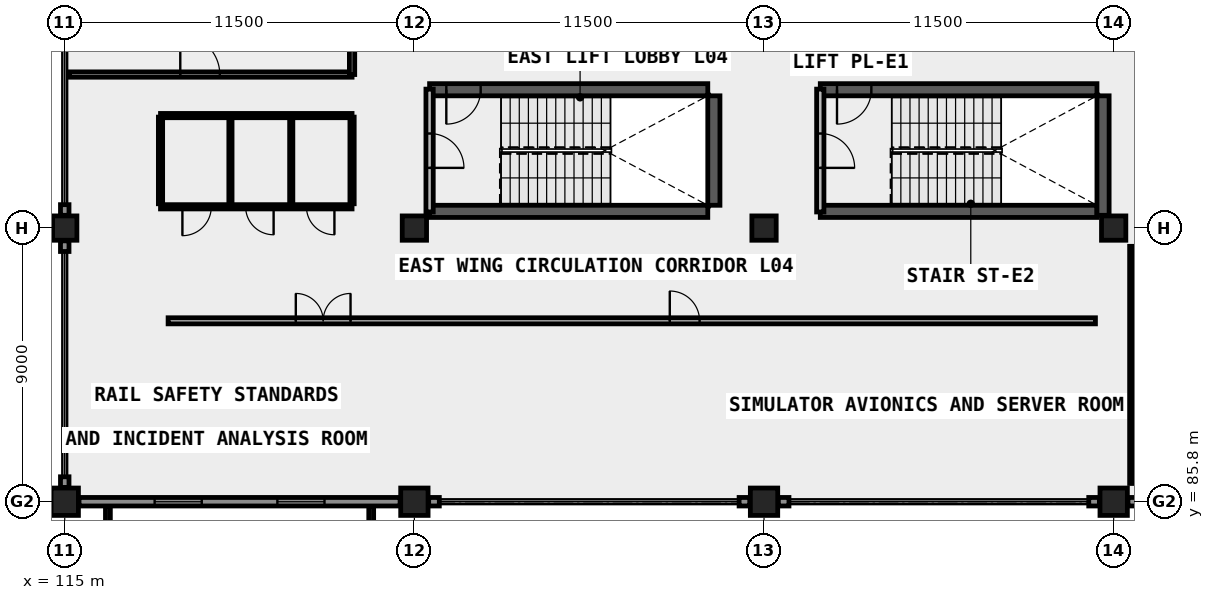
"""IFC4 building model, lengths in metres.
Left out: names, types, materials, properties, quantities, classifications, styles, units other than length and angle.
Written with IfcOpenShell. Run it as: python <this file> out.ifc"""

import sys

from ifc_helpers import new_model, si_unit, direction, frame, frame_2d, origin, origin_2d, place, context, subcontext, project, spatial, rectangle, extrude, element, fill, save


model = new_model("IFC4")
c1 = context("Model", 3, precision=1e-05, world=origin(), true_north=direction((0.0, 1.0)))
c2 = subcontext(c1, "Body", "Model", "MODEL_VIEW")
j1 = project(units=[si_unit("LENGTHUNIT", "METRE"), si_unit("PLANEANGLEUNIT", "RADIAN")], contexts=[c1])
p1 = place(None, origin())
s1 = spatial("IfcSite", under=j1, at=p1, CompositionType="ELEMENT")
p2 = place(p1, origin())
s2 = spatial("IfcBuilding", under=s1, at=p2, CompositionType="ELEMENT")
p3 = place(p2, frame((0.0, 0.0, 18.3)))
s3 = spatial("IfcBuildingStorey", under=s2, at=p3, CompositionType="ELEMENT", Elevation=18.3)
p4 = place(p3, frame((115.0, 85.8, 0.0), z_axis=(0.0, 0.0, 1.0), x_axis=(1.0, 0.0, 0.0)))
e1 = element("IfcColumn", 1, at=p4, inside=s3, PredefinedType="COLUMN", context=c2, shape_type="SweptSolid", body=[
    extrude(rectangle(XDim=0.9, YDim=0.9, at=origin_2d()), origin(), (0.0, 0.0, 1.0), 4.16),
])
p5 = place(p3, frame((115.0, 94.8, 0.0), z_axis=(0.0, 0.0, 1.0), x_axis=(1.0, 0.0, 0.0)))
e2 = element("IfcColumn", 2, at=p5, inside=s3, PredefinedType="COLUMN", context=c2, shape_type="SweptSolid", body=[
    extrude(rectangle(XDim=0.8, YDim=0.8, at=origin_2d()), origin(), (0.0, 0.0, 1.0), 4.16),
])
p6 = place(p3, frame((126.5, 85.8, 0.0), z_axis=(0.0, 0.0, 1.0), x_axis=(1.0, 0.0, 0.0)))
e3 = element("IfcColumn", 3, at=p6, inside=s3, PredefinedType="COLUMN", context=c2, shape_type="SweptSolid", body=[
    extrude(rectangle(XDim=0.9, YDim=0.9, at=origin_2d()), origin(), (0.0, 0.0, 1.0), 4.16),
])
p7 = place(p3, frame((126.5, 94.8, 0.0), z_axis=(0.0, 0.0, 1.0), x_axis=(1.0, 0.0, 0.0)))
e4 = element("IfcColumn", 4, at=p7, inside=s3, PredefinedType="COLUMN", context=c2, shape_type="SweptSolid", body=[
    extrude(rectangle(XDim=0.8, YDim=0.8, at=origin_2d()), origin(), (0.0, 0.0, 1.0), 4.16),
])
p8 = place(p3, frame((138.0, 85.8, 0.0), z_axis=(0.0, 0.0, 1.0), x_axis=(1.0, 0.0, 0.0)))
e5 = element("IfcColumn", 5, at=p8, inside=s3, PredefinedType="COLUMN", context=c2, shape_type="SweptSolid", body=[
    extrude(rectangle(XDim=0.9, YDim=0.9, at=origin_2d()), origin(), (0.0, 0.0, 1.0), 4.16),
])
p9 = place(p3, frame((138.0, 94.8, 0.0), z_axis=(0.0, 0.0, 1.0), x_axis=(1.0, 0.0, 0.0)))
e6 = element("IfcColumn", 6, at=p9, inside=s3, PredefinedType="COLUMN", context=c2, shape_type="SweptSolid", body=[
    extrude(rectangle(XDim=0.8, YDim=0.8, at=origin_2d()), origin(), (0.0, 0.0, 1.0), 4.16),
])
p10 = place(p3, frame((149.5, 85.8, 0.0), z_axis=(0.0, 0.0, 1.0), x_axis=(1.0, 0.0, 0.0)))
e7 = element("IfcColumn", 7, at=p10, inside=s3, PredefinedType="COLUMN", context=c2, shape_type="SweptSolid", body=[
    extrude(rectangle(XDim=0.9, YDim=0.9, at=origin_2d()), origin(), (0.0, 0.0, 1.0), 4.16),
])
p11 = place(p3, frame((149.5, 94.8, 0.0), z_axis=(0.0, 0.0, 1.0), x_axis=(1.0, 0.0, 0.0)))
e8 = element("IfcColumn", 8, at=p11, inside=s3, PredefinedType="COLUMN", context=c2, shape_type="SweptSolid", body=[
    extrude(rectangle(XDim=0.8, YDim=0.8, at=origin_2d()), origin(), (0.0, 0.0, 1.0), 4.16),
])
p12 = place(p3, frame((127.0, 95.35, 0.0), z_axis=(0.0, 0.0, 1.0), x_axis=(1.0, 0.0, 0.0)))
e9 = element("IfcWall", 9, at=p12, inside=s3, PredefinedType="SHEAR", context=c2, shape_type="SweptSolid", body=[
    extrude(rectangle(XDim=9.15, YDim=0.4, at=frame_2d((4.575, 0.0))), origin(), (0.0, 0.0, 1.0), 4.16),
])
p13 = place(p3, frame((127.0, 99.35, 0.0), z_axis=(0.0, 0.0, 1.0), x_axis=(1.0, 0.0, 0.0)))
e10 = element("IfcWall", 10, at=p13, inside=s3, PredefinedType="SHEAR", context=c2, shape_type="SweptSolid", body=[
    extrude(rectangle(XDim=9.15, YDim=0.4, at=frame_2d((4.575, 0.0))), origin(), (0.0, 0.0, 1.0), 4.16),
])
p14 = place(p13, frame((0.55, 0.0, 0.0)))
e11 = element("IfcOpeningElement", 11, at=p14, cuts=e10, PredefinedType="OPENING", context=c2, shape_type="SweptSolid", body=[
    extrude(rectangle(XDim=1.13, YDim=2.15, at=frame_2d((0.565, 1.075))), frame((0.0, 0.21, 0.0), z_axis=(0.0, -1.0, 0.0), x_axis=(1.0, 0.0, 0.0)), (0.0, 0.0, 1.0), 0.42),
])
p15 = place(p3, frame((136.35, 95.55, 0.0), z_axis=(0.0, 0.0, 1.0), x_axis=(0.0, 1.0, 0.0)))
e12 = element("IfcWall", 12, at=p15, inside=s3, PredefinedType="SHEAR", context=c2, shape_type="SweptSolid", body=[
    extrude(rectangle(XDim=3.6, YDim=0.4, at=frame_2d((1.8, 0.0))), origin(), (0.0, 0.0, 1.0), 4.16),
])
p16 = place(p3, frame((139.85, 95.35, 0.0), z_axis=(0.0, 0.0, 1.0), x_axis=(1.0, 0.0, 0.0)))
e13 = element("IfcWall", 13, at=p16, inside=s3, PredefinedType="SHEAR", context=c2, shape_type="SweptSolid", body=[
    extrude(rectangle(XDim=9.1, YDim=0.4, at=frame_2d((4.55, 0.0))), origin(), (0.0, 0.0, 1.0), 4.16),
])
p17 = place(p3, frame((139.85, 99.35, 0.0), z_axis=(0.0, 0.0, 1.0), x_axis=(1.0, 0.0, 0.0)))
e14 = element("IfcWall", 14, at=p17, inside=s3, PredefinedType="SHEAR", context=c2, shape_type="SweptSolid", body=[
    extrude(rectangle(XDim=9.1, YDim=0.4, at=frame_2d((4.55, 0.0))), origin(), (0.0, 0.0, 1.0), 4.16),
])
p18 = place(p17, frame((0.55, 0.0, 0.0)))
e15 = element("IfcOpeningElement", 15, at=p18, cuts=e14, PredefinedType="OPENING", context=c2, shape_type="SweptSolid", body=[
    extrude(rectangle(XDim=1.13, YDim=2.15, at=frame_2d((0.565, 1.075))), frame((0.0, 0.21, 0.0), z_axis=(0.0, -1.0, 0.0), x_axis=(1.0, 0.0, 0.0)), (0.0, 0.0, 1.0), 0.42),
])
p19 = place(p3, frame((149.15, 95.22, 0.0), z_axis=(0.0, 0.0, 1.0), x_axis=(0.0, 1.0, 0.0)))
e16 = element("IfcWall", 16, at=p19, inside=s3, PredefinedType="SHEAR", context=c2, shape_type="SweptSolid", body=[
    extrude(rectangle(XDim=3.93, YDim=0.4, at=frame_2d((1.965, 0.0))), origin(), (0.0, 0.0, 1.0), 4.16),
])
p20 = place(p3, frame((115.47, 85.8, 0.0), z_axis=(0.0, 0.0, 1.0), x_axis=(1.0, 0.0, 0.0)))
e17 = element("IfcWall", 17, at=p20, inside=s3, PredefinedType="SOLIDWALL", context=c2, shape_type="SweptSolid", body=[
    extrude(rectangle(XDim=10.56, YDim=0.28, at=frame_2d((5.28, 0.0))), origin(), (0.0, 0.0, 1.0), 3.1),
])
p21 = place(p20, frame((2.487, 0.0, 0.85)))
e18 = element("IfcOpeningElement", 18, at=p21, cuts=e17, PredefinedType="OPENING", context=c2, shape_type="SweptSolid", body=[
    extrude(rectangle(XDim=1.55, YDim=1.85, at=frame_2d((0.775, 0.925))), frame((0.0, 0.15, 0.0), z_axis=(0.0, -1.0, 0.0), x_axis=(1.0, 0.0, 0.0)), (0.0, 0.0, 1.0), 0.3),
])
p22 = place(p20, frame((6.523, 0.0, 0.85)))
e19 = element("IfcOpeningElement", 19, at=p22, cuts=e17, PredefinedType="OPENING", context=c2, shape_type="SweptSolid", body=[
    extrude(rectangle(XDim=1.55, YDim=1.85, at=frame_2d((0.775, 0.925))), frame((0.0, 0.15, 0.0), z_axis=(0.0, -1.0, 0.0), x_axis=(1.0, 0.0, 0.0)), (0.0, 0.0, 1.0), 0.3),
])
for number, where, z_axis, x_axis in (
    (20, (126.97, 85.8, 0.0), (0.0, 0.0, 1.0), (1.0, 0.0, 0.0)),
    (21, (137.18, 85.8, 0.0), (0.0, 0.0, 1.0), (1.0, 0.0, 0.0)),
    (22, (138.47, 85.8, 0.0), (0.0, 0.0, 1.0), (1.0, 0.0, 0.0)),
    (23, (148.68, 85.8, 0.0), (0.0, 0.0, 1.0), (1.0, 0.0, 0.0)),
):
    element("IfcWall", number, at=place(p3, frame(where, z_axis=z_axis, x_axis=x_axis)), inside=s3, PredefinedType="SOLIDWALL", context=c2, shape_type="SweptSolid", body=[
        extrude(rectangle(XDim=0.35, YDim=0.28, at=frame_2d((0.175, 0.0))), origin(), (0.0, 0.0, 1.0), 3.89),
    ])
p23 = place(p3, frame((149.97, 85.8, 0.0), z_axis=(0.0, 0.0, 1.0), x_axis=(1.0, 0.0, 0.0)))
e24 = element("IfcWall", 24, at=p23, inside=s3, PredefinedType="SOLIDWALL", context=c2, shape_type="SweptSolid", body=[
    extrude(rectangle(XDim=10.56, YDim=0.28, at=frame_2d((5.28, 0.0))), origin(), (0.0, 0.0, 1.0), 3.1),
])
p24 = place(p23, frame((2.487, 0.0, 0.85)))
e25 = element("IfcOpeningElement", 25, at=p24, cuts=e24, PredefinedType="OPENING", context=c2, shape_type="SweptSolid", body=[
    extrude(rectangle(XDim=1.55, YDim=1.85, at=frame_2d((0.775, 0.925))), frame((0.0, 0.15, 0.0), z_axis=(0.0, -1.0, 0.0), x_axis=(1.0, 0.0, 0.0)), (0.0, 0.0, 1.0), 0.3),
])
p25 = place(p23, frame((6.523, 0.0, 0.85)))
e26 = element("IfcOpeningElement", 26, at=p25, cuts=e24, PredefinedType="OPENING", context=c2, shape_type="SweptSolid", body=[
    extrude(rectangle(XDim=1.55, YDim=1.85, at=frame_2d((0.775, 0.925))), frame((0.0, 0.15, 0.0), z_axis=(0.0, -1.0, 0.0), x_axis=(1.0, 0.0, 0.0)), (0.0, 0.0, 1.0), 0.3),
])
p26 = place(p3, frame((115.0, 86.27, 0.0), z_axis=(0.0, 0.0, 1.0), x_axis=(0.0, 1.0, 0.0)))
e27 = element("IfcWall", 27, at=p26, inside=s3, PredefinedType="SOLIDWALL", context=c2, shape_type="SweptSolid", body=[
    extrude(rectangle(XDim=0.35, YDim=0.28, at=frame_2d((0.175, 0.0))), origin(), (0.0, 0.0, 1.0), 3.89),
])
p27 = place(p3, frame((115.0, 94.03, 0.0), z_axis=(0.0, 0.0, 1.0), x_axis=(0.0, 1.0, 0.0)))
e28 = element("IfcWall", 28, at=p27, inside=s3, PredefinedType="SOLIDWALL", context=c2, shape_type="SweptSolid", body=[
    extrude(rectangle(XDim=0.35, YDim=0.28, at=frame_2d((0.175, 0.0))), origin(), (0.0, 0.0, 1.0), 3.89),
])
p28 = place(p3, frame((115.0, 95.22, 0.0), z_axis=(0.0, 0.0, 1.0), x_axis=(0.0, 1.0, 0.0)))
e29 = element("IfcWall", 29, at=p28, inside=s3, PredefinedType="SOLIDWALL", context=c2, shape_type="SweptSolid", body=[
    extrude(rectangle(XDim=0.35, YDim=0.28, at=frame_2d((0.175, 0.0))), origin(), (0.0, 0.0, 1.0), 3.89),
])
p29 = place(p3, frame((127.0, 95.33, 0.0), z_axis=(0.0, 0.0, 1.0), x_axis=(0.0, 1.0, 0.0)))
e30 = element("IfcWall", 30, at=p29, inside=s3, PredefinedType="SOLIDWALL", context=c2, shape_type="SweptSolid", body=[
    extrude(rectangle(XDim=4.04, YDim=0.24, at=frame_2d((2.02, 0.0))), origin(), (0.0, 0.0, 1.0), 3.88),
])
p30 = place(p29, frame((1.45, 0.0, 0.0)))
e31 = element("IfcOpeningElement", 31, at=p30, cuts=e30, PredefinedType="OPENING", context=c2, shape_type="SweptSolid", body=[
    extrude(rectangle(XDim=1.13, YDim=2.15, at=frame_2d((0.565, 1.075))), frame((0.0, 0.13, 0.0), z_axis=(0.0, -1.0, 0.0), x_axis=(1.0, 0.0, 0.0)), (0.0, 0.0, 1.0), 0.26),
])
p31 = place(p3, frame((139.85, 95.33, 0.0), z_axis=(0.0, 0.0, 1.0), x_axis=(0.0, 1.0, 0.0)))
e32 = element("IfcWall", 32, at=p31, inside=s3, PredefinedType="SOLIDWALL", context=c2, shape_type="SweptSolid", body=[
    extrude(rectangle(XDim=4.04, YDim=0.24, at=frame_2d((2.02, 0.0))), origin(), (0.0, 0.0, 1.0), 3.88),
])
p32 = place(p31, frame((1.45, 0.0, 0.0)))
e33 = element("IfcOpeningElement", 33, at=p32, cuts=e32, PredefinedType="OPENING", context=c2, shape_type="SweptSolid", body=[
    extrude(rectangle(XDim=1.13, YDim=2.15, at=frame_2d((0.565, 1.075))), frame((0.0, 0.13, 0.0), z_axis=(0.0, -1.0, 0.0), x_axis=(1.0, 0.0, 0.0)), (0.0, 0.0, 1.0), 0.26),
])
p33 = place(p3, frame((118.15, 95.5, 0.0), z_axis=(0.0, 0.0, 1.0), x_axis=(1.0, 0.0, 0.0)))
e34 = element("IfcWall", 34, at=p33, inside=s3, PredefinedType="PLUMBINGWALL", context=c2, shape_type="SweptSolid", body=[
    extrude(rectangle(XDim=6.3, YDim=0.14, at=frame_2d((3.15, 0.0))), origin(), (0.0, 0.0, 1.0), 3.88),
])
p34 = place(p33, frame((0.72, 0.0, 0.0)))
e35 = element("IfcOpeningElement", 35, at=p34, cuts=e34, PredefinedType="OPENING", context=c2, shape_type="SweptSolid", body=[
    extrude(rectangle(XDim=0.95, YDim=2.1, at=frame_2d((0.475, 1.05))), frame((0.0, 0.08, 0.0), z_axis=(0.0, -1.0, 0.0), x_axis=(1.0, 0.0, 0.0)), (0.0, 0.0, 1.0), 0.16),
])
p35 = place(p33, frame((2.8, 0.0, 0.0)))
e36 = element("IfcOpeningElement", 36, at=p35, cuts=e34, PredefinedType="OPENING", context=c2, shape_type="SweptSolid", body=[
    extrude(rectangle(XDim=0.92, YDim=2.1, at=frame_2d((0.46, 1.05))), frame((0.0, 0.08, 0.0), z_axis=(0.0, -1.0, 0.0), x_axis=(1.0, 0.0, 0.0)), (0.0, 0.0, 1.0), 0.16),
])
p36 = place(p33, frame((4.8, 0.0, 0.0)))
e37 = element("IfcOpeningElement", 37, at=p36, cuts=e34, PredefinedType="OPENING", context=c2, shape_type="SweptSolid", body=[
    extrude(rectangle(XDim=0.92, YDim=2.1, at=frame_2d((0.46, 1.05))), frame((0.0, 0.08, 0.0), z_axis=(0.0, -1.0, 0.0), x_axis=(1.0, 0.0, 0.0)), (0.0, 0.0, 1.0), 0.16),
])
p37 = place(p3, frame((118.15, 95.6, 0.0), z_axis=(0.0, 0.0, 1.0), x_axis=(0.0, 1.0, 0.0)))
e38 = element("IfcWall", 38, at=p37, inside=s3, PredefinedType="PLUMBINGWALL", context=c2, shape_type="SweptSolid", body=[
    extrude(rectangle(XDim=2.85, YDim=0.14, at=frame_2d((1.425, 0.0))), origin(), (0.0, 0.0, 1.0), 3.88),
])
for number, where, z_axis, x_axis in (
    (39, (120.45, 95.6, 0.0), (0.0, 0.0, 1.0), (0.0, 1.0, 0.0)),
    (40, (122.45, 95.6, 0.0), (0.0, 0.0, 1.0), (0.0, 1.0, 0.0)),
):
    element("IfcWall", number, at=place(p3, frame(where, z_axis=z_axis, x_axis=x_axis)), inside=s3, PredefinedType="PARTITIONING", context=c2, shape_type="SweptSolid", body=[
        extrude(rectangle(XDim=2.85, YDim=0.105, at=frame_2d((1.425, 0.0))), origin(), (0.0, 0.0, 1.0), 3.88),
    ])
p38 = place(p3, frame((124.45, 95.6, 0.0), z_axis=(0.0, 0.0, 1.0), x_axis=(0.0, 1.0, 0.0)))
e41 = element("IfcWall", 41, at=p38, inside=s3, PredefinedType="PLUMBINGWALL", context=c2, shape_type="SweptSolid", body=[
    extrude(rectangle(XDim=2.85, YDim=0.14, at=frame_2d((1.425, 0.0))), origin(), (0.0, 0.0, 1.0), 3.88),
])
p39 = place(p3, frame((118.15, 98.5, 0.0), z_axis=(0.0, 0.0, 1.0), x_axis=(1.0, 0.0, 0.0)))
e42 = element("IfcWall", 42, at=p39, inside=s3, PredefinedType="PLUMBINGWALL", context=c2, shape_type="SweptSolid", body=[
    extrude(rectangle(XDim=6.3, YDim=0.14, at=frame_2d((3.15, 0.0))), origin(), (0.0, 0.0, 1.0), 3.88),
])
p40 = place(p3, frame((118.4, 91.75, 0.0), z_axis=(0.0, 0.0, 1.0), x_axis=(1.0, 0.0, 0.0)))
e43 = element("IfcWall", 43, at=p40, inside=s3, PredefinedType="PARTITIONING", context=c2, shape_type="SweptSolid", body=[
    extrude(rectangle(XDim=30.5, YDim=0.2, at=frame_2d((15.25, 0.0))), origin(), (0.0, 0.0, 1.0), 3.88),
])
p41 = place(p40, frame((4.2, 0.0, 0.0)))
e44 = element("IfcOpeningElement", 44, at=p41, cuts=e43, PredefinedType="OPENING", context=c2, shape_type="SweptSolid", body=[
    extrude(rectangle(XDim=1.8, YDim=2.2, at=frame_2d((0.9, 1.1))), frame((0.0, 0.11, 0.0), z_axis=(0.0, -1.0, 0.0), x_axis=(1.0, 0.0, 0.0)), (0.0, 0.0, 1.0), 0.22),
])
p42 = place(p40, frame((16.5, 0.0, 0.0)))
e45 = element("IfcOpeningElement", 45, at=p42, cuts=e43, PredefinedType="OPENING", context=c2, shape_type="SweptSolid", body=[
    extrude(rectangle(XDim=0.98, YDim=2.15, at=frame_2d((0.49, 1.075))), frame((0.0, 0.11, 0.0), z_axis=(0.0, -1.0, 0.0), x_axis=(1.0, 0.0, 0.0)), (0.0, 0.0, 1.0), 0.22),
])
p43 = place(p3, frame((115.16, 99.85, 0.0), z_axis=(0.0, 0.0, 1.0), x_axis=(1.0, 0.0, 0.0)))
e46 = element("IfcWall", 46, at=p43, inside=s3, PredefinedType="PARTITIONING", context=c2, shape_type="SweptSolid", body=[
    extrude(rectangle(XDim=9.29, YDim=0.175, at=frame_2d((4.645, 0.0))), origin(), (0.0, 0.0, 1.0), 3.88),
])
p44 = place(p43, frame((3.64, 0.0, 0.0)))
e47 = element("IfcOpeningElement", 47, at=p44, cuts=e46, PredefinedType="OPENING", context=c2, shape_type="SweptSolid", body=[
    extrude(rectangle(XDim=1.3, YDim=2.2, at=frame_2d((0.65, 1.1))), frame((0.0, 0.098, 0.0), z_axis=(0.0, -1.0, 0.0), x_axis=(1.0, 0.0, 0.0)), (0.0, 0.0, 1.0), 0.195),
])
p45 = place(p3, frame((124.45, 99.85, 0.0), z_axis=(0.0, 0.0, 1.0), x_axis=(0.0, 1.0, 0.0)))
e48 = element("IfcWall", 48, at=p45, inside=s3, PredefinedType="PARTITIONING", context=c2, shape_type="SweptSolid", body=[
    extrude(rectangle(XDim=14.55, YDim=0.175, at=frame_2d((7.275, 0.0))), origin(), (0.0, 0.0, 1.0), 3.88),
])
p46 = place(p3, frame((150.1, 86.4, 0.0), z_axis=(0.0, 0.0, 1.0), x_axis=(0.0, 1.0, 0.0)))
e49 = element("IfcWall", 49, at=p46, inside=s3, PredefinedType="PARTITIONING", context=c2, shape_type="SweptSolid", body=[
    extrude(rectangle(XDim=7.8, YDim=0.15, at=frame_2d((3.9, 0.0))), origin(), (0.0, 0.0, 1.0), 3.88),
])
p47 = place(p46, frame((2.8, 0.0, 0.0)))
e50 = element("IfcOpeningElement", 50, at=p47, cuts=e49, PredefinedType="OPENING", context=c2, shape_type="SweptSolid", body=[
    extrude(rectangle(XDim=1.4, YDim=2.15, at=frame_2d((0.7, 1.075))), frame((0.0, 0.085, 0.0), z_axis=(0.0, -1.0, 0.0), x_axis=(1.0, 0.0, 0.0)), (0.0, 0.0, 1.0), 0.17),
])
p48 = place(p21, origin())
e51 = element("IfcWindow", 51, at=p48, inside=s3, PartitioningType="SINGLE_PANEL", PredefinedType="WINDOW", context=c2, shape_type="SweptSolid", body=[
    extrude(rectangle(XDim=1.55, YDim=1.85, at=frame_2d((0.775, 0.925))), frame((0.0, 0.03, 0.0), z_axis=(0.0, -1.0, 0.0), x_axis=(1.0, 0.0, 0.0)), (0.0, 0.0, 1.0), 0.06),
])
fill(e18, e51)
p49 = place(p22, origin())
e52 = element("IfcWindow", 52, at=p49, inside=s3, PartitioningType="SINGLE_PANEL", PredefinedType="WINDOW", context=c2, shape_type="SweptSolid", body=[
    extrude(rectangle(XDim=1.55, YDim=1.85, at=frame_2d((0.775, 0.925))), frame((0.0, 0.03, 0.0), z_axis=(0.0, -1.0, 0.0), x_axis=(1.0, 0.0, 0.0)), (0.0, 0.0, 1.0), 0.06),
])
fill(e19, e52)
p50 = place(p30, frame((0.565, 0.0, 0.0), z_axis=(0.0, 0.0, 1.0), x_axis=(-1.0, 0.0, 0.0)))
e53 = element("IfcDoor", 53, at=p50, inside=s3, OperationType="SINGLE_SWING_LEFT", PredefinedType="DOOR", context=c2, shape_type="SweptSolid", body=[
    extrude(rectangle(XDim=1.13, YDim=2.15, at=frame_2d((0.0, 1.075))), frame((0.0, 0.025, 0.0), z_axis=(0.0, -1.0, 0.0), x_axis=(1.0, 0.0, 0.0)), (0.0, 0.0, 1.0), 0.05),
])
fill(e31, e53)
p51 = place(p14, frame((0.565, 0.0, 0.0), z_axis=(0.0, 0.0, 1.0), x_axis=(-1.0, 0.0, 0.0)))
e54 = element("IfcDoor", 54, at=p51, inside=s3, OperationType="SINGLE_SWING_LEFT", PredefinedType="DOOR", context=c2, shape_type="SweptSolid", body=[
    extrude(rectangle(XDim=1.13, YDim=2.15, at=frame_2d((0.0, 1.075))), frame((0.0, 0.025, 0.0), z_axis=(0.0, -1.0, 0.0), x_axis=(1.0, 0.0, 0.0)), (0.0, 0.0, 1.0), 0.05),
])
fill(e11, e54)
p52 = place(p32, frame((0.565, 0.0, 0.0), z_axis=(0.0, 0.0, 1.0), x_axis=(-1.0, 0.0, 0.0)))
e55 = element("IfcDoor", 55, at=p52, inside=s3, OperationType="SINGLE_SWING_LEFT", PredefinedType="DOOR", context=c2, shape_type="SweptSolid", body=[
    extrude(rectangle(XDim=1.13, YDim=2.15, at=frame_2d((0.0, 1.075))), frame((0.0, 0.025, 0.0), z_axis=(0.0, -1.0, 0.0), x_axis=(1.0, 0.0, 0.0)), (0.0, 0.0, 1.0), 0.05),
])
fill(e33, e55)
p53 = place(p18, frame((0.565, 0.0, 0.0), z_axis=(0.0, 0.0, 1.0), x_axis=(-1.0, 0.0, 0.0)))
e56 = element("IfcDoor", 56, at=p53, inside=s3, OperationType="SINGLE_SWING_LEFT", PredefinedType="DOOR", context=c2, shape_type="SweptSolid", body=[
    extrude(rectangle(XDim=1.13, YDim=2.15, at=frame_2d((0.0, 1.075))), frame((0.0, 0.025, 0.0), z_axis=(0.0, -1.0, 0.0), x_axis=(1.0, 0.0, 0.0)), (0.0, 0.0, 1.0), 0.05),
])
fill(e15, e56)
p54 = place(p34, frame((0.475, 0.0, 0.0), z_axis=(0.0, 0.0, 1.0), x_axis=(-1.0, 0.0, 0.0)))
e57 = element("IfcDoor", 57, at=p54, inside=s3, OperationType="SINGLE_SWING_LEFT", PredefinedType="DOOR", context=c2, shape_type="SweptSolid", body=[
    extrude(rectangle(XDim=0.95, YDim=2.1, at=frame_2d((0.0, 1.05))), frame((0.0, 0.025, 0.0), z_axis=(0.0, -1.0, 0.0), x_axis=(1.0, 0.0, 0.0)), (0.0, 0.0, 1.0), 0.05),
])
fill(e35, e57)
p55 = place(p35, origin())
e58 = element("IfcDoor", 58, at=p55, inside=s3, OperationType="SINGLE_SWING_RIGHT", PredefinedType="DOOR", context=c2, shape_type="SweptSolid", body=[
    extrude(rectangle(XDim=0.92, YDim=2.1, at=frame_2d((0.46, 1.05))), frame((0.0, 0.025, 0.0), z_axis=(0.0, -1.0, 0.0), x_axis=(1.0, 0.0, 0.0)), (0.0, 0.0, 1.0), 0.05),
])
fill(e36, e58)
p56 = place(p36, origin())
e59 = element("IfcDoor", 59, at=p56, inside=s3, OperationType="SINGLE_SWING_RIGHT", PredefinedType="DOOR", context=c2, shape_type="SweptSolid", body=[
    extrude(rectangle(XDim=0.92, YDim=2.1, at=frame_2d((0.46, 1.05))), frame((0.0, 0.025, 0.0), z_axis=(0.0, -1.0, 0.0), x_axis=(1.0, 0.0, 0.0)), (0.0, 0.0, 1.0), 0.05),
])
fill(e37, e59)
p57 = place(p41, origin())
e60 = element("IfcDoor", 60, at=p57, inside=s3, OperationType="DOUBLE_DOOR_SINGLE_SWING", PredefinedType="DOOR", context=c2, shape_type="SweptSolid", body=[
    extrude(rectangle(XDim=1.8, YDim=2.2, at=frame_2d((0.9, 1.1))), frame((0.0, 0.025, 0.0), z_axis=(0.0, -1.0, 0.0), x_axis=(1.0, 0.0, 0.0)), (0.0, 0.0, 1.0), 0.05),
])
fill(e44, e60)
p58 = place(p42, origin())
e61 = element("IfcDoor", 61, at=p58, inside=s3, OperationType="SINGLE_SWING_LEFT", PredefinedType="DOOR", context=c2, shape_type="SweptSolid", body=[
    extrude(rectangle(XDim=0.98, YDim=2.15, at=frame_2d((0.49, 1.075))), frame((0.0, 0.025, 0.0), z_axis=(0.0, -1.0, 0.0), x_axis=(1.0, 0.0, 0.0)), (0.0, 0.0, 1.0), 0.05),
])
fill(e45, e61)
p59 = place(p44, origin())
e62 = element("IfcDoor", 62, at=p59, inside=s3, OperationType="SINGLE_SWING_LEFT", PredefinedType="DOOR", context=c2, shape_type="SweptSolid", body=[
    extrude(rectangle(XDim=1.3, YDim=2.2, at=frame_2d((0.65, 1.1))), frame((0.0, 0.025, 0.0), z_axis=(0.0, -1.0, 0.0), x_axis=(1.0, 0.0, 0.0)), (0.0, 0.0, 1.0), 0.05),
])
fill(e47, e62)
p60 = place(p47, origin())
e63 = element("IfcDoor", 63, at=p60, inside=s3, OperationType="SINGLE_SWING_RIGHT", PredefinedType="DOOR", context=c2, shape_type="SweptSolid", body=[
    extrude(rectangle(XDim=1.4, YDim=2.15, at=frame_2d((0.7, 1.075))), frame((0.0, 0.025, 0.0), z_axis=(0.0, -1.0, 0.0), x_axis=(1.0, 0.0, 0.0)), (0.0, 0.0, 1.0), 0.05),
])
fill(e50, e63)
save(model, sys.argv[1])
